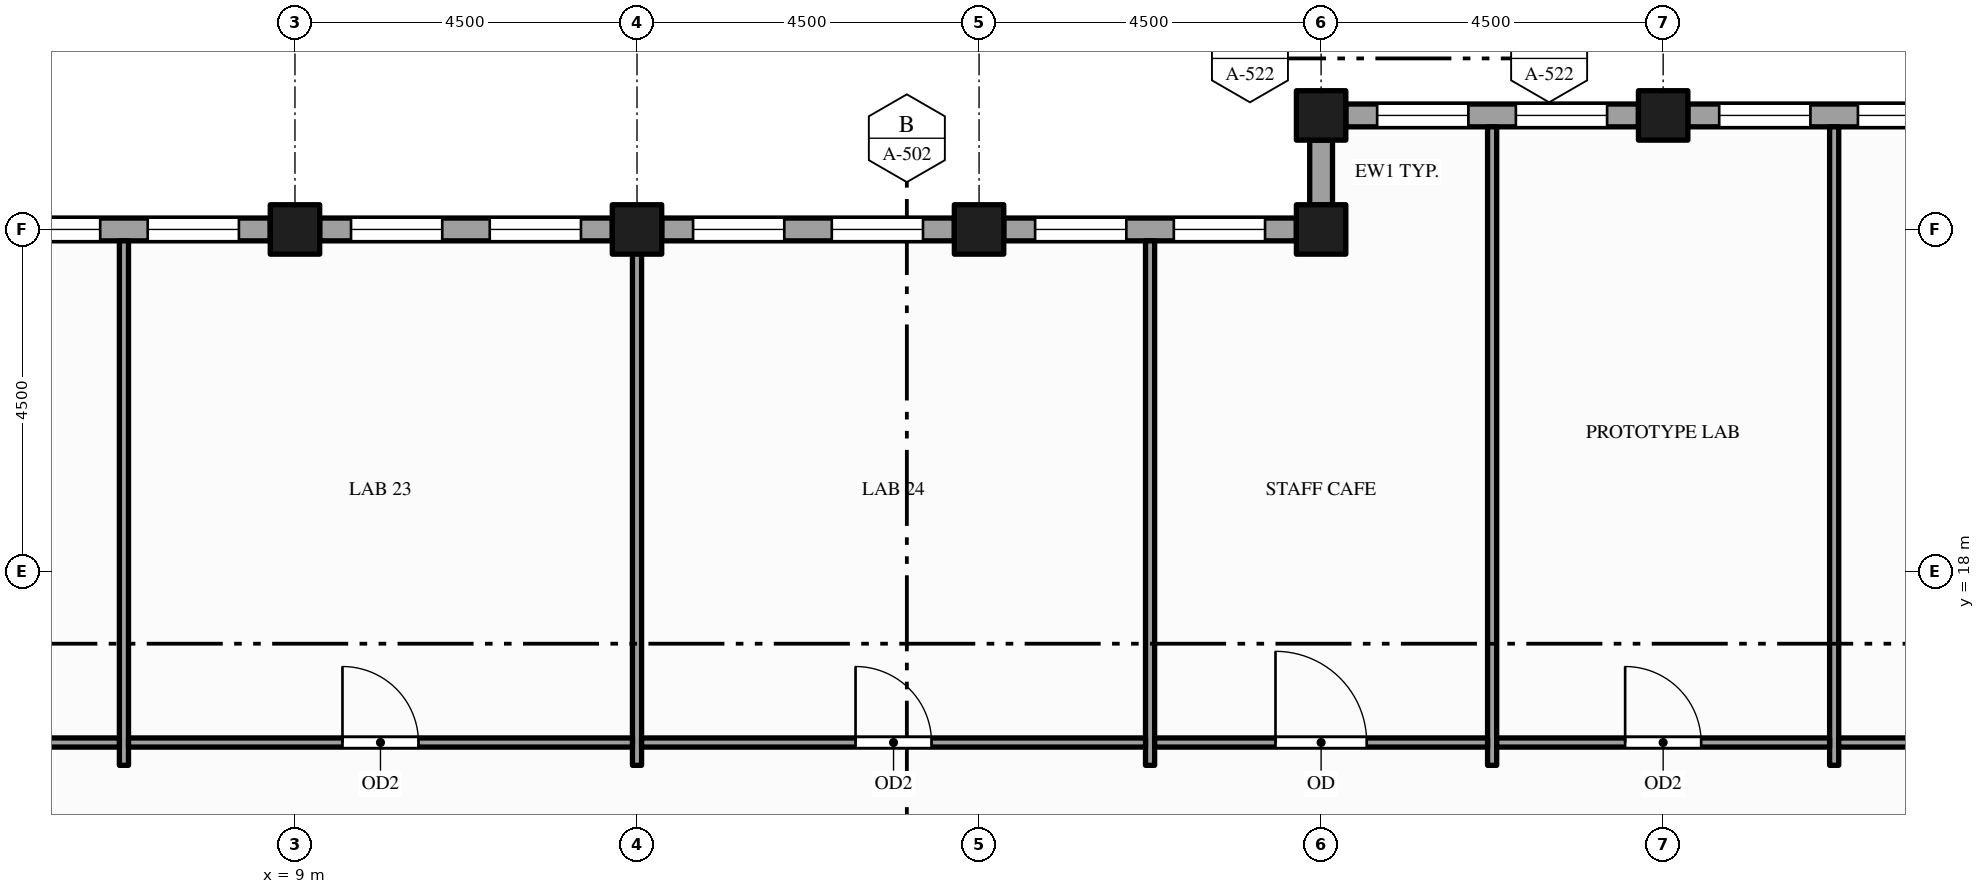
"""IFC4 building model, lengths in metres.
Left out: names, types, materials, properties, quantities, classifications, styles, units other than length and angle.
Written with IfcOpenShell. Run it as: python <this file> out.ifc"""

import sys

from ifc_helpers import new_model, si_unit, direction, frame, frame_2d, origin, origin_2d, place, context, subcontext, project, spatial, rectangle, hollow_rectangle, extrude, element, fill, save


model = new_model("IFC4")
c1 = context("Model", 3, precision=1e-05, world=origin(), true_north=direction((0.0, 1.0)))
c2 = subcontext(c1, "Body", "Model", "MODEL_VIEW")
j1 = project(units=[si_unit("LENGTHUNIT", "METRE"), si_unit("PLANEANGLEUNIT", "RADIAN")], contexts=[c1])
p1 = place(None, origin())
s1 = spatial("IfcSite", under=j1, at=p1, CompositionType="ELEMENT")
p2 = place(p1, origin())
s2 = spatial("IfcBuilding", under=s1, at=p2, CompositionType="ELEMENT")
p3 = place(p2, frame((0.0, 0.0, 285.0)))
s3 = spatial("IfcBuildingStorey", under=s2, at=p3, CompositionType="ELEMENT", Elevation=285.0)
for number, where, z_axis, x_axis in (
    (1, (9.0, 22.5, -0.15), (0.0, 0.0, 1.0), (1.0, 0.0, 0.0)),
    (2, (13.5, 22.5, -0.15), (0.0, 0.0, 1.0), (1.0, 0.0, 0.0)),
    (3, (18.0, 22.5, -0.15), (0.0, 0.0, 1.0), (1.0, 0.0, 0.0)),
    (4, (22.5, 22.5, -0.15), (0.0, 0.0, 1.0), (1.0, 0.0, 0.0)),
    (5, (22.5, 24.0, -0.15), (0.0, 0.0, 1.0), (1.0, 0.0, 0.0)),
    (6, (27.0, 24.0, -0.15), (0.0, 0.0, 1.0), (1.0, 0.0, 0.0)),
):
    element("IfcColumn", number, at=place(p3, frame(where, z_axis=z_axis, x_axis=x_axis)), inside=s3, PredefinedType="COLUMN", context=c2, shape_type="SweptSolid", body=[
        extrude(hollow_rectangle(XDim=0.65, YDim=0.65, WallThickness=0.032, at=origin_2d()), origin(), (0.0, 0.0, 1.0), 4.0),
    ])
p4 = place(p3, frame((31.175, 24.0, 0.0), z_axis=(0.0, 0.0, 1.0), x_axis=(-1.0, 0.0, 0.0)))
e7 = element("IfcWall", 7, at=p4, inside=s3, PredefinedType="STANDARD", context=c2, shape_type="SweptSolid", body=[
    extrude(rectangle(XDim=3.85, YDim=0.3, at=frame_2d((1.925, 0.0))), origin(), (0.0, 0.0, 1.0), 2.87),
])
p5 = place(p4, frame((0.413, 0.0, 0.9)))
e8 = element("IfcOpeningElement", 8, at=p5, cuts=e7, PredefinedType="OPENING", context=c2, shape_type="SweptSolid", body=[
    extrude(rectangle(XDim=1.2, YDim=1.75, at=frame_2d((0.6, 0.875))), frame((0.0, 0.16, 0.0), z_axis=(0.0, -1.0, 0.0), x_axis=(1.0, 0.0, 0.0)), (0.0, 0.0, 1.0), 0.32),
])
p6 = place(p4, frame((2.238, 0.0, 0.9)))
e9 = element("IfcOpeningElement", 9, at=p6, cuts=e7, PredefinedType="OPENING", context=c2, shape_type="SweptSolid", body=[
    extrude(rectangle(XDim=1.2, YDim=1.75, at=frame_2d((0.6, 0.875))), frame((0.0, 0.16, 0.0), z_axis=(0.0, -1.0, 0.0), x_axis=(1.0, 0.0, 0.0)), (0.0, 0.0, 1.0), 0.32),
])
p7 = place(p3, frame((26.675, 24.0, 0.0), z_axis=(0.0, 0.0, 1.0), x_axis=(-1.0, 0.0, 0.0)))
e10 = element("IfcWall", 10, at=p7, inside=s3, PredefinedType="STANDARD", context=c2, shape_type="SweptSolid", body=[
    extrude(rectangle(XDim=3.85, YDim=0.3, at=frame_2d((1.925, 0.0))), origin(), (0.0, 0.0, 1.0), 2.87),
])
p8 = place(p7, frame((0.413, 0.0, 0.9)))
e11 = element("IfcOpeningElement", 11, at=p8, cuts=e10, PredefinedType="OPENING", context=c2, shape_type="SweptSolid", body=[
    extrude(rectangle(XDim=1.2, YDim=1.75, at=frame_2d((0.6, 0.875))), frame((0.0, 0.16, 0.0), z_axis=(0.0, -1.0, 0.0), x_axis=(1.0, 0.0, 0.0)), (0.0, 0.0, 1.0), 0.32),
])
p9 = place(p7, frame((2.238, 0.0, 0.9)))
e12 = element("IfcOpeningElement", 12, at=p9, cuts=e10, PredefinedType="OPENING", context=c2, shape_type="SweptSolid", body=[
    extrude(rectangle(XDim=1.2, YDim=1.75, at=frame_2d((0.6, 0.875))), frame((0.0, 0.16, 0.0), z_axis=(0.0, -1.0, 0.0), x_axis=(1.0, 0.0, 0.0)), (0.0, 0.0, 1.0), 0.32),
])
p10 = place(p3, frame((22.5, 23.675, 0.0), z_axis=(0.0, 0.0, 1.0), x_axis=(0.0, -1.0, 0.0)))
e13 = element("IfcWall", 13, at=p10, inside=s3, PredefinedType="STANDARD", context=c2, shape_type="SweptSolid", body=[
    extrude(rectangle(XDim=0.85, YDim=0.3, at=frame_2d((0.425, 0.0))), origin(), (0.0, 0.0, 1.0), 3.162),
])
p11 = place(p3, frame((22.175, 22.5, 0.0), z_axis=(0.0, 0.0, 1.0), x_axis=(-1.0, 0.0, 0.0)))
e14 = element("IfcWall", 14, at=p11, inside=s3, PredefinedType="STANDARD", context=c2, shape_type="SweptSolid", body=[
    extrude(rectangle(XDim=3.85, YDim=0.3, at=frame_2d((1.925, 0.0))), origin(), (0.0, 0.0, 1.0), 2.87),
])
p12 = place(p11, frame((0.413, 0.0, 0.9)))
e15 = element("IfcOpeningElement", 15, at=p12, cuts=e14, PredefinedType="OPENING", context=c2, shape_type="SweptSolid", body=[
    extrude(rectangle(XDim=1.2, YDim=1.75, at=frame_2d((0.6, 0.875))), frame((0.0, 0.16, 0.0), z_axis=(0.0, -1.0, 0.0), x_axis=(1.0, 0.0, 0.0)), (0.0, 0.0, 1.0), 0.32),
])
p13 = place(p11, frame((2.238, 0.0, 0.9)))
e16 = element("IfcOpeningElement", 16, at=p13, cuts=e14, PredefinedType="OPENING", context=c2, shape_type="SweptSolid", body=[
    extrude(rectangle(XDim=1.2, YDim=1.75, at=frame_2d((0.6, 0.875))), frame((0.0, 0.16, 0.0), z_axis=(0.0, -1.0, 0.0), x_axis=(1.0, 0.0, 0.0)), (0.0, 0.0, 1.0), 0.32),
])
p14 = place(p3, frame((17.675, 22.5, 0.0), z_axis=(0.0, 0.0, 1.0), x_axis=(-1.0, 0.0, 0.0)))
e17 = element("IfcWall", 17, at=p14, inside=s3, PredefinedType="STANDARD", context=c2, shape_type="SweptSolid", body=[
    extrude(rectangle(XDim=3.85, YDim=0.3, at=frame_2d((1.925, 0.0))), origin(), (0.0, 0.0, 1.0), 2.87),
])
p15 = place(p14, frame((0.413, 0.0, 0.9)))
e18 = element("IfcOpeningElement", 18, at=p15, cuts=e17, PredefinedType="OPENING", context=c2, shape_type="SweptSolid", body=[
    extrude(rectangle(XDim=1.2, YDim=1.75, at=frame_2d((0.6, 0.875))), frame((0.0, 0.16, 0.0), z_axis=(0.0, -1.0, 0.0), x_axis=(1.0, 0.0, 0.0)), (0.0, 0.0, 1.0), 0.32),
])
p16 = place(p14, frame((2.238, 0.0, 0.9)))
e19 = element("IfcOpeningElement", 19, at=p16, cuts=e17, PredefinedType="OPENING", context=c2, shape_type="SweptSolid", body=[
    extrude(rectangle(XDim=1.2, YDim=1.75, at=frame_2d((0.6, 0.875))), frame((0.0, 0.16, 0.0), z_axis=(0.0, -1.0, 0.0), x_axis=(1.0, 0.0, 0.0)), (0.0, 0.0, 1.0), 0.32),
])
p17 = place(p3, frame((13.175, 22.5, 0.0), z_axis=(0.0, 0.0, 1.0), x_axis=(-1.0, 0.0, 0.0)))
e20 = element("IfcWall", 20, at=p17, inside=s3, PredefinedType="STANDARD", context=c2, shape_type="SweptSolid", body=[
    extrude(rectangle(XDim=3.85, YDim=0.3, at=frame_2d((1.925, 0.0))), origin(), (0.0, 0.0, 1.0), 2.87),
])
p18 = place(p17, frame((0.413, 0.0, 0.9)))
e21 = element("IfcOpeningElement", 21, at=p18, cuts=e20, PredefinedType="OPENING", context=c2, shape_type="SweptSolid", body=[
    extrude(rectangle(XDim=1.2, YDim=1.75, at=frame_2d((0.6, 0.875))), frame((0.0, 0.16, 0.0), z_axis=(0.0, -1.0, 0.0), x_axis=(1.0, 0.0, 0.0)), (0.0, 0.0, 1.0), 0.32),
])
p19 = place(p17, frame((2.238, 0.0, 0.9)))
e22 = element("IfcOpeningElement", 22, at=p19, cuts=e20, PredefinedType="OPENING", context=c2, shape_type="SweptSolid", body=[
    extrude(rectangle(XDim=1.2, YDim=1.75, at=frame_2d((0.6, 0.875))), frame((0.0, 0.16, 0.0), z_axis=(0.0, -1.0, 0.0), x_axis=(1.0, 0.0, 0.0)), (0.0, 0.0, 1.0), 0.32),
])
p20 = place(p3, frame((8.675, 22.5, 0.0), z_axis=(0.0, 0.0, 1.0), x_axis=(-1.0, 0.0, 0.0)))
e23 = element("IfcWall", 23, at=p20, inside=s3, PredefinedType="STANDARD", context=c2, shape_type="SweptSolid", body=[
    extrude(rectangle(XDim=3.85, YDim=0.3, at=frame_2d((1.925, 0.0))), origin(), (0.0, 0.0, 1.0), 2.87),
])
p21 = place(p20, frame((0.413, 0.0, 0.9)))
e24 = element("IfcOpeningElement", 24, at=p21, cuts=e23, PredefinedType="OPENING", context=c2, shape_type="SweptSolid", body=[
    extrude(rectangle(XDim=1.2, YDim=1.75, at=frame_2d((0.6, 0.875))), frame((0.0, 0.16, 0.0), z_axis=(0.0, -1.0, 0.0), x_axis=(1.0, 0.0, 0.0)), (0.0, 0.0, 1.0), 0.32),
])
p22 = place(p20, frame((2.238, 0.0, 0.9)))
e25 = element("IfcOpeningElement", 25, at=p22, cuts=e23, PredefinedType="OPENING", context=c2, shape_type="SweptSolid", body=[
    extrude(rectangle(XDim=1.2, YDim=1.75, at=frame_2d((0.6, 0.875))), frame((0.0, 0.16, 0.0), z_axis=(0.0, -1.0, 0.0), x_axis=(1.0, 0.0, 0.0)), (0.0, 0.0, 1.0), 0.32),
])
for number, where, z_axis, x_axis in (
    (26, (6.75, 15.45, 0.0), (0.0, 0.0, 1.0), (0.0, 1.0, 0.0)),
    (27, (13.5, 15.45, 0.0), (0.0, 0.0, 1.0), (0.0, 1.0, 0.0)),
    (28, (20.25, 15.45, 0.0), (0.0, 0.0, 1.0), (0.0, 1.0, 0.0)),
):
    element("IfcWall", number, at=place(p3, frame(where, z_axis=z_axis, x_axis=x_axis)), inside=s3, PredefinedType="PARTITIONING", context=c2, shape_type="SweptSolid", body=[
        extrude(rectangle(XDim=6.9, YDim=0.12, at=frame_2d((3.45, 0.0))), origin(), (0.0, 0.0, 1.0), 2.87),
    ])
for number, where, z_axis, x_axis in (
    (29, (24.75, 15.45, 0.0), (0.0, 0.0, 1.0), (0.0, 1.0, 0.0)),
    (30, (29.25, 15.45, 0.0), (0.0, 0.0, 1.0), (0.0, 1.0, 0.0)),
):
    element("IfcWall", number, at=place(p3, frame(where, z_axis=z_axis, x_axis=x_axis)), inside=s3, PredefinedType="PARTITIONING", context=c2, shape_type="SweptSolid", body=[
        extrude(rectangle(XDim=8.4, YDim=0.12, at=frame_2d((4.2, 0.0))), origin(), (0.0, 0.0, 1.0), 2.87),
    ])
p23 = place(p3, frame((0.15, 15.75, 0.0), z_axis=(0.0, 0.0, 1.0), x_axis=(1.0, 0.0, 0.0)))
e31 = element("IfcWall", 31, at=p23, inside=s3, PredefinedType="PARTITIONING", context=c2, shape_type="SweptSolid", body=[
    extrude(rectangle(XDim=6.54, YDim=0.12, at=frame_2d((3.27, 0.0))), origin(), (0.0, 0.0, 1.0), 2.87),
])
p24 = place(p23, frame((2.78, 0.0, 0.0)))
e32 = element("IfcOpeningElement", 32, at=p24, cuts=e31, PredefinedType="OPENING", context=c2, shape_type="SweptSolid", body=[
    extrude(rectangle(XDim=1.0, YDim=2.1, at=frame_2d((0.5, 1.05))), frame((0.0, 0.07, 0.0), z_axis=(0.0, -1.0, 0.0), x_axis=(1.0, 0.0, 0.0)), (0.0, 0.0, 1.0), 0.14),
])
p25 = place(p3, frame((6.81, 15.75, 0.0), z_axis=(0.0, 0.0, 1.0), x_axis=(1.0, 0.0, 0.0)))
e33 = element("IfcWall", 33, at=p25, inside=s3, PredefinedType="PARTITIONING", context=c2, shape_type="SweptSolid", body=[
    extrude(rectangle(XDim=6.63, YDim=0.12, at=frame_2d((3.315, 0.0))), origin(), (0.0, 0.0, 1.0), 2.87),
])
p26 = place(p25, frame((2.815, 0.0, 0.0)))
e34 = element("IfcOpeningElement", 34, at=p26, cuts=e33, PredefinedType="OPENING", context=c2, shape_type="SweptSolid", body=[
    extrude(rectangle(XDim=1.0, YDim=2.1, at=frame_2d((0.5, 1.05))), frame((0.0, 0.07, 0.0), z_axis=(0.0, -1.0, 0.0), x_axis=(1.0, 0.0, 0.0)), (0.0, 0.0, 1.0), 0.14),
])
p27 = place(p3, frame((13.56, 15.75, 0.0), z_axis=(0.0, 0.0, 1.0), x_axis=(1.0, 0.0, 0.0)))
e35 = element("IfcWall", 35, at=p27, inside=s3, PredefinedType="PARTITIONING", context=c2, shape_type="SweptSolid", body=[
    extrude(rectangle(XDim=6.63, YDim=0.12, at=frame_2d((3.315, 0.0))), origin(), (0.0, 0.0, 1.0), 2.87),
])
p28 = place(p27, frame((2.815, 0.0, 0.0)))
e36 = element("IfcOpeningElement", 36, at=p28, cuts=e35, PredefinedType="OPENING", context=c2, shape_type="SweptSolid", body=[
    extrude(rectangle(XDim=1.0, YDim=2.1, at=frame_2d((0.5, 1.05))), frame((0.0, 0.07, 0.0), z_axis=(0.0, -1.0, 0.0), x_axis=(1.0, 0.0, 0.0)), (0.0, 0.0, 1.0), 0.14),
])
p29 = place(p3, frame((20.31, 15.75, 0.0), z_axis=(0.0, 0.0, 1.0), x_axis=(1.0, 0.0, 0.0)))
e37 = element("IfcWall", 37, at=p29, inside=s3, PredefinedType="PARTITIONING", context=c2, shape_type="SweptSolid", body=[
    extrude(rectangle(XDim=4.38, YDim=0.12, at=frame_2d((2.19, 0.0))), origin(), (0.0, 0.0, 1.0), 2.87),
])
p30 = place(p29, frame((1.59, 0.0, 0.0)))
e38 = element("IfcOpeningElement", 38, at=p30, cuts=e37, PredefinedType="OPENING", context=c2, shape_type="SweptSolid", body=[
    extrude(rectangle(XDim=1.2, YDim=2.1, at=frame_2d((0.6, 1.05))), frame((0.0, 0.07, 0.0), z_axis=(0.0, -1.0, 0.0), x_axis=(1.0, 0.0, 0.0)), (0.0, 0.0, 1.0), 0.14),
])
p31 = place(p3, frame((24.81, 15.75, 0.0), z_axis=(0.0, 0.0, 1.0), x_axis=(1.0, 0.0, 0.0)))
e39 = element("IfcWall", 39, at=p31, inside=s3, PredefinedType="PARTITIONING", context=c2, shape_type="SweptSolid", body=[
    extrude(rectangle(XDim=4.38, YDim=0.12, at=frame_2d((2.19, 0.0))), origin(), (0.0, 0.0, 1.0), 2.87),
])
p32 = place(p31, frame((1.69, 0.0, 0.0)))
e40 = element("IfcOpeningElement", 40, at=p32, cuts=e39, PredefinedType="OPENING", context=c2, shape_type="SweptSolid", body=[
    extrude(rectangle(XDim=1.0, YDim=2.1, at=frame_2d((0.5, 1.05))), frame((0.0, 0.07, 0.0), z_axis=(0.0, -1.0, 0.0), x_axis=(1.0, 0.0, 0.0)), (0.0, 0.0, 1.0), 0.14),
])
p33 = place(p3, frame((29.31, 15.75, 0.0), z_axis=(0.0, 0.0, 1.0), x_axis=(1.0, 0.0, 0.0)))
e41 = element("IfcWall", 41, at=p33, inside=s3, PredefinedType="PARTITIONING", context=c2, shape_type="SweptSolid", body=[
    extrude(rectangle(XDim=11.13, YDim=0.12, at=frame_2d((5.565, 0.0))), origin(), (0.0, 0.0, 1.0), 2.87),
])
p34 = place(p33, frame((5.065, 0.0, 0.0)))
e42 = element("IfcOpeningElement", 42, at=p34, cuts=e41, PredefinedType="OPENING", context=c2, shape_type="SweptSolid", body=[
    extrude(rectangle(XDim=1.0, YDim=2.1, at=frame_2d((0.5, 1.05))), frame((0.0, 0.07, 0.0), z_axis=(0.0, -1.0, 0.0), x_axis=(1.0, 0.0, 0.0)), (0.0, 0.0, 1.0), 0.14),
])
p35 = place(p5, origin())
e43 = element("IfcWindow", 43, at=p35, inside=s3, PartitioningType="SINGLE_PANEL", PredefinedType="WINDOW", context=c2, shape_type="SweptSolid", body=[
    extrude(rectangle(XDim=1.2, YDim=1.75, at=frame_2d((0.6, 0.875))), frame((0.0, 0.03, 0.0), z_axis=(0.0, -1.0, 0.0), x_axis=(1.0, 0.0, 0.0)), (0.0, 0.0, 1.0), 0.06),
])
fill(e8, e43)
p36 = place(p6, origin())
e44 = element("IfcWindow", 44, at=p36, inside=s3, PartitioningType="SINGLE_PANEL", PredefinedType="WINDOW", context=c2, shape_type="SweptSolid", body=[
    extrude(rectangle(XDim=1.2, YDim=1.75, at=frame_2d((0.6, 0.875))), frame((0.0, 0.03, 0.0), z_axis=(0.0, -1.0, 0.0), x_axis=(1.0, 0.0, 0.0)), (0.0, 0.0, 1.0), 0.06),
])
fill(e9, e44)
p37 = place(p8, origin())
e45 = element("IfcWindow", 45, at=p37, inside=s3, PartitioningType="SINGLE_PANEL", PredefinedType="WINDOW", context=c2, shape_type="SweptSolid", body=[
    extrude(rectangle(XDim=1.2, YDim=1.75, at=frame_2d((0.6, 0.875))), frame((0.0, 0.03, 0.0), z_axis=(0.0, -1.0, 0.0), x_axis=(1.0, 0.0, 0.0)), (0.0, 0.0, 1.0), 0.06),
])
fill(e11, e45)
p38 = place(p9, origin())
e46 = element("IfcWindow", 46, at=p38, inside=s3, PartitioningType="SINGLE_PANEL", PredefinedType="WINDOW", context=c2, shape_type="SweptSolid", body=[
    extrude(rectangle(XDim=1.2, YDim=1.75, at=frame_2d((0.6, 0.875))), frame((0.0, 0.03, 0.0), z_axis=(0.0, -1.0, 0.0), x_axis=(1.0, 0.0, 0.0)), (0.0, 0.0, 1.0), 0.06),
])
fill(e12, e46)
p39 = place(p12, origin())
e47 = element("IfcWindow", 47, at=p39, inside=s3, PartitioningType="SINGLE_PANEL", PredefinedType="WINDOW", context=c2, shape_type="SweptSolid", body=[
    extrude(rectangle(XDim=1.2, YDim=1.75, at=frame_2d((0.6, 0.875))), frame((0.0, 0.03, 0.0), z_axis=(0.0, -1.0, 0.0), x_axis=(1.0, 0.0, 0.0)), (0.0, 0.0, 1.0), 0.06),
])
fill(e15, e47)
p40 = place(p13, origin())
e48 = element("IfcWindow", 48, at=p40, inside=s3, PartitioningType="SINGLE_PANEL", PredefinedType="WINDOW", context=c2, shape_type="SweptSolid", body=[
    extrude(rectangle(XDim=1.2, YDim=1.75, at=frame_2d((0.6, 0.875))), frame((0.0, 0.03, 0.0), z_axis=(0.0, -1.0, 0.0), x_axis=(1.0, 0.0, 0.0)), (0.0, 0.0, 1.0), 0.06),
])
fill(e16, e48)
p41 = place(p15, origin())
e49 = element("IfcWindow", 49, at=p41, inside=s3, PartitioningType="SINGLE_PANEL", PredefinedType="WINDOW", context=c2, shape_type="SweptSolid", body=[
    extrude(rectangle(XDim=1.2, YDim=1.75, at=frame_2d((0.6, 0.875))), frame((0.0, 0.03, 0.0), z_axis=(0.0, -1.0, 0.0), x_axis=(1.0, 0.0, 0.0)), (0.0, 0.0, 1.0), 0.06),
])
fill(e18, e49)
p42 = place(p16, origin())
e50 = element("IfcWindow", 50, at=p42, inside=s3, PartitioningType="SINGLE_PANEL", PredefinedType="WINDOW", context=c2, shape_type="SweptSolid", body=[
    extrude(rectangle(XDim=1.2, YDim=1.75, at=frame_2d((0.6, 0.875))), frame((0.0, 0.03, 0.0), z_axis=(0.0, -1.0, 0.0), x_axis=(1.0, 0.0, 0.0)), (0.0, 0.0, 1.0), 0.06),
])
fill(e19, e50)
p43 = place(p18, origin())
e51 = element("IfcWindow", 51, at=p43, inside=s3, PartitioningType="SINGLE_PANEL", PredefinedType="WINDOW", context=c2, shape_type="SweptSolid", body=[
    extrude(rectangle(XDim=1.2, YDim=1.75, at=frame_2d((0.6, 0.875))), frame((0.0, 0.03, 0.0), z_axis=(0.0, -1.0, 0.0), x_axis=(1.0, 0.0, 0.0)), (0.0, 0.0, 1.0), 0.06),
])
fill(e21, e51)
p44 = place(p19, origin())
e52 = element("IfcWindow", 52, at=p44, inside=s3, PartitioningType="SINGLE_PANEL", PredefinedType="WINDOW", context=c2, shape_type="SweptSolid", body=[
    extrude(rectangle(XDim=1.2, YDim=1.75, at=frame_2d((0.6, 0.875))), frame((0.0, 0.03, 0.0), z_axis=(0.0, -1.0, 0.0), x_axis=(1.0, 0.0, 0.0)), (0.0, 0.0, 1.0), 0.06),
])
fill(e22, e52)
p45 = place(p21, origin())
e53 = element("IfcWindow", 53, at=p45, inside=s3, PartitioningType="SINGLE_PANEL", PredefinedType="WINDOW", context=c2, shape_type="SweptSolid", body=[
    extrude(rectangle(XDim=1.2, YDim=1.75, at=frame_2d((0.6, 0.875))), frame((0.0, 0.03, 0.0), z_axis=(0.0, -1.0, 0.0), x_axis=(1.0, 0.0, 0.0)), (0.0, 0.0, 1.0), 0.06),
])
fill(e24, e53)
p46 = place(p22, origin())
e54 = element("IfcWindow", 54, at=p46, inside=s3, PartitioningType="SINGLE_PANEL", PredefinedType="WINDOW", context=c2, shape_type="SweptSolid", body=[
    extrude(rectangle(XDim=1.2, YDim=1.75, at=frame_2d((0.6, 0.875))), frame((0.0, 0.03, 0.0), z_axis=(0.0, -1.0, 0.0), x_axis=(1.0, 0.0, 0.0)), (0.0, 0.0, 1.0), 0.06),
])
fill(e25, e54)
p47 = place(p26, origin())
e55 = element("IfcDoor", 55, at=p47, inside=s3, OperationType="SINGLE_SWING_LEFT", PredefinedType="DOOR", context=c2, shape_type="SweptSolid", body=[
    extrude(rectangle(XDim=1.0, YDim=2.1, at=frame_2d((0.5, 1.05))), frame((0.0, 0.025, 0.0), z_axis=(0.0, -1.0, 0.0), x_axis=(1.0, 0.0, 0.0)), (0.0, 0.0, 1.0), 0.05),
])
fill(e34, e55)
p48 = place(p28, origin())
e56 = element("IfcDoor", 56, at=p48, inside=s3, OperationType="SINGLE_SWING_LEFT", PredefinedType="DOOR", context=c2, shape_type="SweptSolid", body=[
    extrude(rectangle(XDim=1.0, YDim=2.1, at=frame_2d((0.5, 1.05))), frame((0.0, 0.025, 0.0), z_axis=(0.0, -1.0, 0.0), x_axis=(1.0, 0.0, 0.0)), (0.0, 0.0, 1.0), 0.05),
])
fill(e36, e56)
p49 = place(p30, origin())
e57 = element("IfcDoor", 57, at=p49, inside=s3, OperationType="SINGLE_SWING_LEFT", PredefinedType="DOOR", context=c2, shape_type="SweptSolid", body=[
    extrude(rectangle(XDim=1.2, YDim=2.1, at=frame_2d((0.6, 1.05))), frame((0.0, 0.025, 0.0), z_axis=(0.0, -1.0, 0.0), x_axis=(1.0, 0.0, 0.0)), (0.0, 0.0, 1.0), 0.05),
])
fill(e38, e57)
p50 = place(p32, origin())
e58 = element("IfcDoor", 58, at=p50, inside=s3, OperationType="SINGLE_SWING_LEFT", PredefinedType="DOOR", context=c2, shape_type="SweptSolid", body=[
    extrude(rectangle(XDim=1.0, YDim=2.1, at=frame_2d((0.5, 1.05))), frame((0.0, 0.025, 0.0), z_axis=(0.0, -1.0, 0.0), x_axis=(1.0, 0.0, 0.0)), (0.0, 0.0, 1.0), 0.05),
])
fill(e40, e58)
save(model, sys.argv[1])
